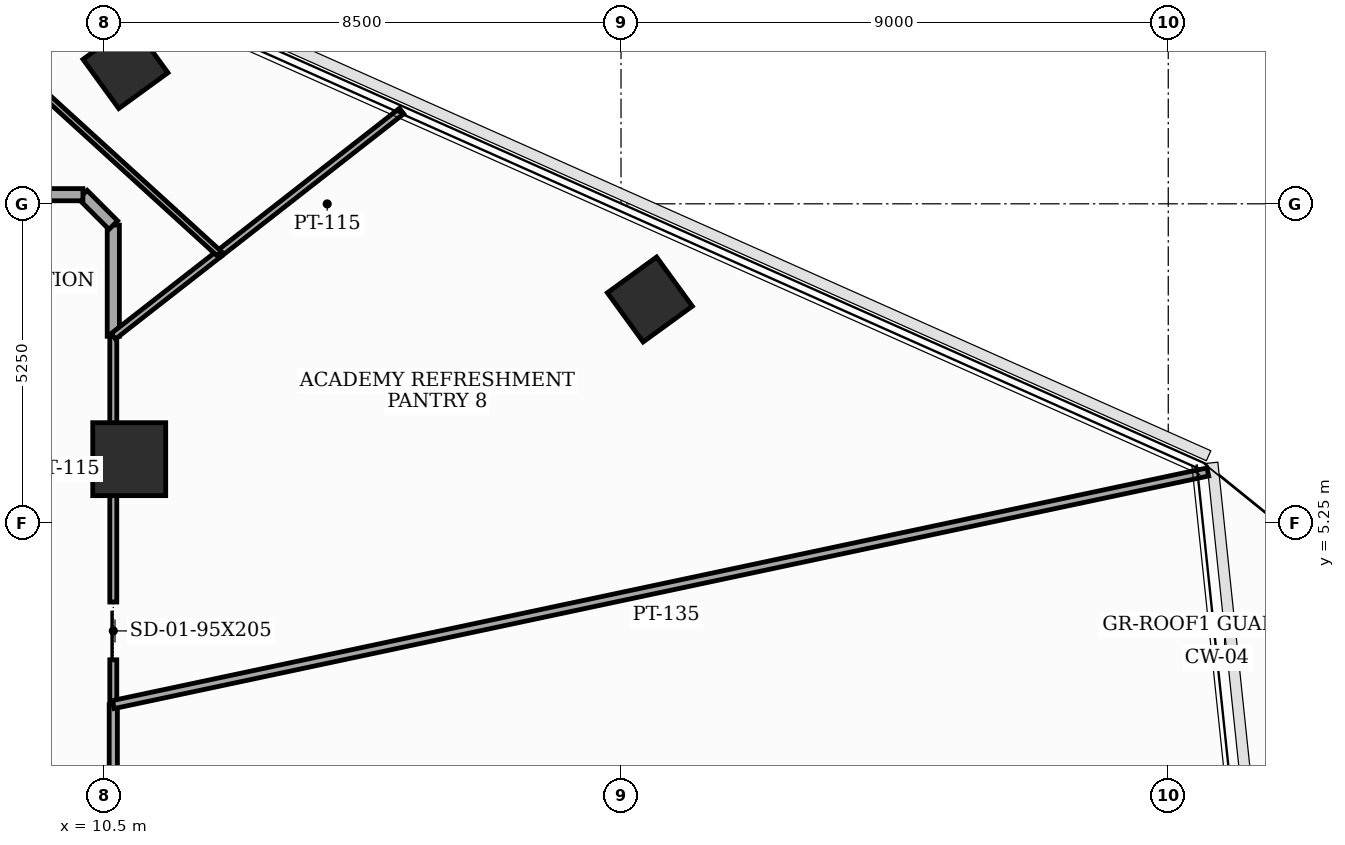
"""IFC4 building model, lengths in metres.
Left out: names, types, materials, properties, quantities, classifications, styles, units other than length and angle.
Written with IfcOpenShell. Run it as: python <this file> out.ifc"""

import sys

from ifc_helpers import new_model, si_unit, direction, frame, frame_2d, origin, origin_2d, place, context, subcontext, project, spatial, rectangle, extrude, element, fill, save


model = new_model("IFC4")
c1 = context("Model", 3, precision=1e-05, world=origin(), true_north=direction((0.0, 1.0)))
c2 = subcontext(c1, "Body", "Model", "MODEL_VIEW")
j1 = project(units=[si_unit("LENGTHUNIT", "METRE"), si_unit("PLANEANGLEUNIT", "RADIAN")], contexts=[c1])
p1 = place(None, origin())
s1 = spatial("IfcSite", under=j1, at=p1, CompositionType="ELEMENT")
p2 = place(p1, origin())
s2 = spatial("IfcBuilding", under=s1, at=p2, CompositionType="ELEMENT")
p3 = place(p2, frame((0.0, 0.0, 173.1)))
s3 = spatial("IfcBuildingStorey", under=s2, at=p3, CompositionType="ELEMENT", Elevation=173.1)
p4 = place(p3, frame((10.912, 6.3, 0.0), z_axis=(0.0, 0.0, 1.0), x_axis=(1.0, 0.0, 0.0)))
e1 = element("IfcColumn", 1, at=p4, inside=s3, PredefinedType="COLUMN", context=c2, shape_type="SweptSolid", body=[
    extrude(rectangle(XDim=1.2, YDim=1.2, at=origin_2d()), origin(), (0.0, 0.0, 1.0), 3.7),
])
for number, where, z_axis, x_axis in (
    (2, (19.474, 8.926, 0.0), (0.0, 0.0, 1.0), (0.809, 0.588, 0.0)),
    (3, (10.85, 12.766, 0.0), (0.0, 0.0, 1.0), (0.809, 0.588, 0.0)),
):
    element("IfcColumn", number, at=place(p3, frame(where, z_axis=z_axis, x_axis=x_axis)), inside=s3, PredefinedType="COLUMN", context=c2, shape_type="SweptSolid", body=[
        extrude(rectangle(XDim=1.0, YDim=1.0, at=origin_2d()), origin(), (0.0, 0.0, 1.0), 3.7),
    ])
p5 = place(p3, frame((10.65, -5.194, 0.0), z_axis=(0.0, 0.0, 1.0), x_axis=(0.0, 1.0, 0.0)))
e4 = element("IfcWall", 4, at=p5, inside=s3, PredefinedType="PARTITIONING", context=c2, shape_type="SweptSolid", body=[
    extrude(rectangle(XDim=7.458, YDim=0.135, at=frame_2d((3.729, 0.0))), origin(), (0.0, 0.0, 1.0), 2.885),
])
p6 = place(p5, frame((3.254, 0.0, 0.0)))
e5 = element("IfcOpeningElement", 5, at=p6, cuts=e4, PredefinedType="OPENING", context=c2, shape_type="SweptSolid", body=[
    extrude(rectangle(XDim=0.95, YDim=2.1, at=frame_2d((0.475, 1.05))), frame((0.0, 0.077, 0.0), z_axis=(0.0, -1.0, 0.0), x_axis=(1.0, 0.0, 0.0)), (0.0, 0.0, 1.0), 0.155),
])
p7 = place(p3, frame((10.65, 2.264, 0.0), z_axis=(0.0, 0.0, 1.0), x_axis=(0.0, 1.0, 0.0)))
e6 = element("IfcWall", 6, at=p7, inside=s3, PredefinedType="PARTITIONING", context=c2, shape_type="SweptSolid", body=[
    extrude(rectangle(XDim=6.057, YDim=0.115, at=frame_2d((3.029, 0.0))), origin(), (0.0, 0.0, 1.0), 2.075),
])
p8 = place(p7, frame((0.736, 0.0, 0.0)))
e7 = element("IfcOpeningElement", 7, at=p8, cuts=e6, PredefinedType="OPENING", context=c2, shape_type="SweptSolid", body=[
    extrude(rectangle(XDim=0.95, YDim=2.025, at=frame_2d((0.475, 1.012))), frame((0.0, 0.067, 0.0), z_axis=(0.0, -1.0, 0.0), x_axis=(1.0, 0.0, 0.0)), (0.0, 0.0, 1.0), 0.135),
])
p9 = place(p3, frame((10.65, 8.321, 0.0), z_axis=(0.0, 0.0, 1.0), x_axis=(0.0, 1.0, 0.0)))
e8 = element("IfcWall", 8, at=p9, inside=s3, PredefinedType="SOLIDWALL", context=c2, shape_type="SweptSolid", body=[
    extrude(rectangle(XDim=1.829, YDim=0.2, at=frame_2d((0.915, 0.0))), origin(), (0.0, 0.0, 1.0), 2.075),
])
p10 = place(p3, frame((10.65, 10.15, 0.0), z_axis=(0.0, 0.0, 1.0), x_axis=(-0.707106781187, 0.707106781187, 0.0)))
e9 = element("IfcWall", 9, at=p10, inside=s3, PredefinedType="SOLIDWALL", context=c2, shape_type="SweptSolid", body=[
    extrude(rectangle(XDim=0.707, YDim=0.2, at=frame_2d((0.354, 0.0))), origin(), (0.0, 0.0, 1.0), 2.075),
])
p11 = place(p3, frame((10.15, 10.65, 0.0), z_axis=(0.0, 0.0, 1.0), x_axis=(-1.0, 0.0, 0.0)))
e10 = element("IfcWall", 10, at=p11, inside=s3, PredefinedType="SOLIDWALL", context=c2, shape_type="SweptSolid", body=[
    extrude(rectangle(XDim=12.414, YDim=0.2, at=frame_2d((6.207, 0.0))), origin(), (0.0, 0.0, 1.0), 2.875),
])
p12 = place(p11, frame((7.222, 0.0, 0.0)))
e11 = element("IfcOpeningElement", 11, at=p12, cuts=e10, PredefinedType="OPENING", context=c2, shape_type="SweptSolid", body=[
    extrude(rectangle(XDim=0.95, YDim=2.1, at=frame_2d((0.475, 1.05))), frame((0.0, 0.11, 0.0), z_axis=(0.0, -1.0, 0.0), x_axis=(1.0, 0.0, 0.0)), (0.0, 0.0, 1.0), 0.22),
])
p13 = place(p3, frame((28.651, 6.09, 0.0), z_axis=(0.0, 0.0, 1.0), x_axis=(-0.978150893197, -0.207896200392, 0.0)))
e12 = element("IfcWall", 12, at=p13, inside=s3, PredefinedType="PARTITIONING", context=c2, shape_type="SweptSolid", body=[
    extrude(rectangle(XDim=18.403, YDim=0.135, at=frame_2d((9.202, 0.0))), origin(), (0.0, 0.0, 1.0), 2.885),
])
p14 = place(p3, frame((15.391, 12.025, 0.0), z_axis=(0.0, 0.0, 1.0), x_axis=(-0.787968951689, -0.615714975597, 0.0)))
e13 = element("IfcWall", 13, at=p14, inside=s3, PredefinedType="PARTITIONING", context=c2, shape_type="SweptSolid", body=[
    extrude(rectangle(XDim=3.807, YDim=0.115, at=frame_2d((1.903, 0.0))), origin(), (0.0, 0.0, 1.0), 2.975),
])
p15 = place(p3, frame((12.391, 9.681, 0.0), z_axis=(0.0, 0.0, 1.0), x_axis=(-0.788124883644, -0.615515367624, 0.0)))
e14 = element("IfcWall", 14, at=p15, inside=s3, PredefinedType="PARTITIONING", context=c2, shape_type="SweptSolid", body=[
    extrude(rectangle(XDim=2.209, YDim=0.115, at=frame_2d((1.104, 0.0))), origin(), (0.0, 0.0, 1.0), 2.075),
])
p16 = place(p3, frame((8.177, 13.52, 0.0), z_axis=(0.0, 0.0, 1.0), x_axis=(0.739232344885, -0.673450473514, 0.0)))
e15 = element("IfcWall", 15, at=p16, inside=s3, PredefinedType="MOVABLE", context=c2, shape_type="SweptSolid", body=[
    extrude(rectangle(XDim=5.701, YDim=0.1, at=frame_2d((2.85, 0.0))), origin(), (0.0, 0.0, 1.0), 2.075),
])
p17 = place(p8, origin())
e16 = element("IfcDoor", 16, at=p17, inside=s3, OperationType="SLIDING_TO_LEFT", PredefinedType="DOOR", context=c2, shape_type="SweptSolid", body=[
    extrude(rectangle(XDim=0.95, YDim=2.025, at=frame_2d((0.475, 1.012))), frame((0.0, 0.025, 0.0), z_axis=(0.0, -1.0, 0.0), x_axis=(1.0, 0.0, 0.0)), (0.0, 0.0, 1.0), 0.05),
])
fill(e7, e16)
save(model, sys.argv[1])
